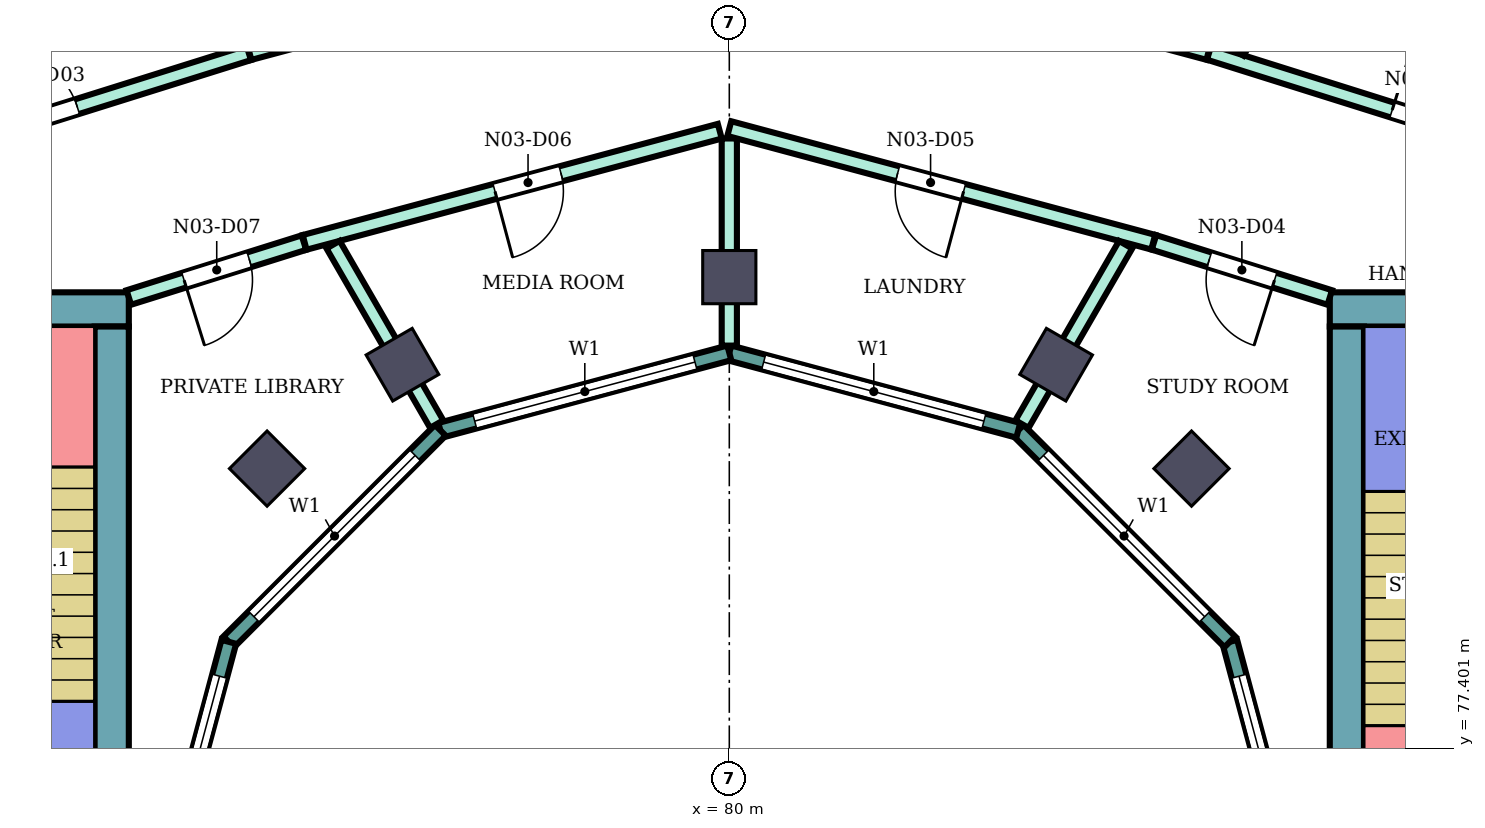
"""IFC4 building model, lengths in metres.
Left out: names, types, materials, properties, quantities, classifications, styles, units other than length and angle.
Written with IfcOpenShell. Run it as: python <this file> out.ifc"""

import sys

from ifc_helpers import new_model, si_unit, direction, frame, frame_2d, origin, origin_2d, place, context, subcontext, project, spatial, rectangle, extrude, element, fill, save


model = new_model("IFC4")
c1 = context("Model", 3, precision=1e-05, world=origin(), true_north=direction((0.0, 1.0)))
c2 = subcontext(c1, "Body", "Model", "MODEL_VIEW")
j1 = project(units=[si_unit("LENGTHUNIT", "METRE"), si_unit("PLANEANGLEUNIT", "RADIAN")], contexts=[c1])
p1 = place(None, origin())
s1 = spatial("IfcSite", under=j1, at=p1, CompositionType="ELEMENT")
p2 = place(p1, origin())
s2 = spatial("IfcBuilding", under=s1, at=p2, CompositionType="ELEMENT")
p3 = place(p2, frame((0.0, 0.0, 292.5)))
s3 = spatial("IfcBuildingStorey", under=s2, at=p3, CompositionType="ELEMENT", Elevation=292.5)
for number, where, z_axis, x_axis in (
    (1, (86.081, 81.081, 0.0), (0.0, 0.0, 1.0), (0.707, 0.707, 0.0)),
    (2, (84.3, 82.448, 0.0), (0.0, 0.0, 1.0), (0.5, 0.866, 0.0)),
    (3, (80.0, 83.6, 0.0), (0.0, 0.0, 1.0), (0.0, 1.0, 0.0)),
    (4, (75.7, 82.448, 0.0), (0.0, 0.0, 1.0), (-0.5, 0.866, 0.0)),
    (5, (73.919, 81.081, 0.0), (0.0, 0.0, 1.0), (-0.707, 0.707, 0.0)),
):
    element("IfcColumn", number, at=place(p3, frame(where, z_axis=z_axis, x_axis=x_axis)), inside=s3, PredefinedType="COLUMN", context=c2, shape_type="SweptSolid", body=[
        extrude(rectangle(XDim=0.7, YDim=0.7, at=origin_2d()), origin(), (0.0, 0.0, 1.0), 4.2),
    ])
p4 = place(p3, frame((87.9, 83.175, 0.0), z_axis=(0.0, 0.0, 1.0), x_axis=(1.0, 0.0, 0.0)))
e6 = element("IfcWall", 6, at=p4, inside=s3, PredefinedType="SHEAR", context=c2, shape_type="SweptSolid", body=[
    extrude(rectangle(XDim=12.0, YDim=0.45, at=frame_2d((6.0, 0.0))), origin(), (0.0, 0.0, 1.0), 3.88),
])
p5 = place(p4, frame((4.2, 0.0, 0.0)))
e7 = element("IfcOpeningElement", 7, at=p5, cuts=e6, PredefinedType="OPENING", context=c2, shape_type="SweptSolid", body=[
    extrude(rectangle(XDim=2.4, YDim=2.4, at=frame_2d((1.2, 1.2))), frame((0.0, 0.235, 0.0), z_axis=(0.0, -1.0, 0.0), x_axis=(1.0, 0.0, 0.0)), (0.0, 0.0, 1.0), 0.47),
])
p6 = place(p3, frame((88.125, 75.0, 0.0), z_axis=(0.0, 0.0, 1.0), x_axis=(0.0, 1.0, 0.0)))
e8 = element("IfcWall", 8, at=p6, inside=s3, PredefinedType="SHEAR", context=c2, shape_type="SweptSolid", body=[
    extrude(rectangle(XDim=7.95, YDim=0.45, at=frame_2d((3.975, 0.0))), origin(), (0.0, 0.0, 1.0), 3.88),
])
p7 = place(p3, frame((72.1, 83.175, 0.0), z_axis=(0.0, 0.0, 1.0), x_axis=(-1.0, 0.0, 0.0)))
e9 = element("IfcWall", 9, at=p7, inside=s3, PredefinedType="SHEAR", context=c2, shape_type="SweptSolid", body=[
    extrude(rectangle(XDim=12.0, YDim=0.45, at=frame_2d((6.0, 0.0))), origin(), (0.0, 0.0, 1.0), 3.88),
])
p8 = place(p7, frame((4.2, 0.0, 0.0)))
e10 = element("IfcOpeningElement", 10, at=p8, cuts=e9, PredefinedType="OPENING", context=c2, shape_type="SweptSolid", body=[
    extrude(rectangle(XDim=2.4, YDim=2.4, at=frame_2d((1.2, 1.2))), frame((0.0, 0.235, 0.0), z_axis=(0.0, -1.0, 0.0), x_axis=(1.0, 0.0, 0.0)), (0.0, 0.0, 1.0), 0.47),
])
p9 = place(p3, frame((71.875, 82.95, 0.0), z_axis=(0.0, 0.0, 1.0), x_axis=(0.0, -1.0, 0.0)))
e11 = element("IfcWall", 11, at=p9, inside=s3, PredefinedType="SHEAR", context=c2, shape_type="SweptSolid", body=[
    extrude(rectangle(XDim=7.95, YDim=0.45, at=frame_2d((3.975, 0.0))), origin(), (0.0, 0.0, 1.0), 3.88),
])
p10 = place(p3, frame((87.604, 75.0, 0.0), z_axis=(0.0, 0.0, 1.0), x_axis=(-0.258789828301, 0.965933654434, 0.0)))
e12 = element("IfcWall", 12, at=p10, inside=s3, PredefinedType="NOTDEFINED", context=c2, shape_type="SweptSolid", body=[
    extrude(rectangle(XDim=3.936, YDim=0.2, at=frame_2d((1.968, 0.0))), origin(), (0.0, 0.0, 1.0), 4.2),
])
p11 = place(p10, frame((0.468, 0.0, 0.9)))
e13 = element("IfcOpeningElement", 13, at=p11, cuts=e12, PredefinedType="OPENING", context=c2, shape_type="SweptSolid", body=[
    extrude(rectangle(XDim=3.0, YDim=2.3, at=frame_2d((1.5, 1.15))), frame((0.0, 0.11, 0.0), z_axis=(0.0, -1.0, 0.0), x_axis=(1.0, 0.0, 0.0)), (0.0, 0.0, 1.0), 0.22),
])
p12 = place(p3, frame((86.585, 78.802, 0.0), z_axis=(0.0, 0.0, 1.0), x_axis=(-0.707106781187, 0.707106781187, 0.0)))
e14 = element("IfcWall", 14, at=p12, inside=s3, PredefinedType="NOTDEFINED", context=c2, shape_type="SweptSolid", body=[
    extrude(rectangle(XDim=3.936, YDim=0.2, at=frame_2d((1.968, 0.0))), origin(), (0.0, 0.0, 1.0), 4.2),
])
p13 = place(p12, frame((0.468, 0.0, 0.9)))
e15 = element("IfcOpeningElement", 15, at=p13, cuts=e14, PredefinedType="OPENING", context=c2, shape_type="SweptSolid", body=[
    extrude(rectangle(XDim=3.0, YDim=2.3, at=frame_2d((1.5, 1.15))), frame((0.0, 0.11, 0.0), z_axis=(0.0, -1.0, 0.0), x_axis=(1.0, 0.0, 0.0)), (0.0, 0.0, 1.0), 0.22),
])
p14 = place(p3, frame((83.802, 81.585, 0.0), z_axis=(0.0, 0.0, 1.0), x_axis=(-0.965933654434, 0.258789828301, 0.0)))
e16 = element("IfcWall", 16, at=p14, inside=s3, PredefinedType="NOTDEFINED", context=c2, shape_type="SweptSolid", body=[
    extrude(rectangle(XDim=3.936, YDim=0.2, at=frame_2d((1.968, 0.0))), origin(), (0.0, 0.0, 1.0), 4.2),
])
p15 = place(p14, frame((0.468, 0.0, 0.9)))
e17 = element("IfcOpeningElement", 17, at=p15, cuts=e16, PredefinedType="OPENING", context=c2, shape_type="SweptSolid", body=[
    extrude(rectangle(XDim=3.0, YDim=2.3, at=frame_2d((1.5, 1.15))), frame((0.0, 0.11, 0.0), z_axis=(0.0, -1.0, 0.0), x_axis=(1.0, 0.0, 0.0)), (0.0, 0.0, 1.0), 0.22),
])
p16 = place(p3, frame((80.0, 82.604, 0.0), z_axis=(0.0, 0.0, 1.0), x_axis=(-0.965933654434, -0.258789828301, 0.0)))
e18 = element("IfcWall", 18, at=p16, inside=s3, PredefinedType="NOTDEFINED", context=c2, shape_type="SweptSolid", body=[
    extrude(rectangle(XDim=3.936, YDim=0.2, at=frame_2d((1.968, 0.0))), origin(), (0.0, 0.0, 1.0), 4.2),
])
p17 = place(p16, frame((0.468, 0.0, 0.9)))
e19 = element("IfcOpeningElement", 19, at=p17, cuts=e18, PredefinedType="OPENING", context=c2, shape_type="SweptSolid", body=[
    extrude(rectangle(XDim=3.0, YDim=2.3, at=frame_2d((1.5, 1.15))), frame((0.0, 0.11, 0.0), z_axis=(0.0, -1.0, 0.0), x_axis=(1.0, 0.0, 0.0)), (0.0, 0.0, 1.0), 0.22),
])
p18 = place(p3, frame((76.198, 81.585, 0.0), z_axis=(0.0, 0.0, 1.0), x_axis=(-0.707106781187, -0.707106781187, 0.0)))
e20 = element("IfcWall", 20, at=p18, inside=s3, PredefinedType="NOTDEFINED", context=c2, shape_type="SweptSolid", body=[
    extrude(rectangle(XDim=3.936, YDim=0.2, at=frame_2d((1.968, 0.0))), origin(), (0.0, 0.0, 1.0), 4.2),
])
p19 = place(p18, frame((0.468, 0.0, 0.9)))
e21 = element("IfcOpeningElement", 21, at=p19, cuts=e20, PredefinedType="OPENING", context=c2, shape_type="SweptSolid", body=[
    extrude(rectangle(XDim=3.0, YDim=2.3, at=frame_2d((1.5, 1.15))), frame((0.0, 0.11, 0.0), z_axis=(0.0, -1.0, 0.0), x_axis=(1.0, 0.0, 0.0)), (0.0, 0.0, 1.0), 0.22),
])
p20 = place(p3, frame((73.415, 78.802, 0.0), z_axis=(0.0, 0.0, 1.0), x_axis=(-0.258789828301, -0.965933654434, 0.0)))
e22 = element("IfcWall", 22, at=p20, inside=s3, PredefinedType="NOTDEFINED", context=c2, shape_type="SweptSolid", body=[
    extrude(rectangle(XDim=3.936, YDim=0.2, at=frame_2d((1.968, 0.0))), origin(), (0.0, 0.0, 1.0), 4.2),
])
p21 = place(p20, frame((0.468, 0.0, 0.9)))
e23 = element("IfcOpeningElement", 23, at=p21, cuts=e22, PredefinedType="OPENING", context=c2, shape_type="SweptSolid", body=[
    extrude(rectangle(XDim=3.0, YDim=2.3, at=frame_2d((1.5, 1.15))), frame((0.0, 0.11, 0.0), z_axis=(0.0, -1.0, 0.0), x_axis=(1.0, 0.0, 0.0)), (0.0, 0.0, 1.0), 0.22),
])
p22 = place(p3, frame((68.201, 84.833, 0.0), z_axis=(0.0, 0.0, 1.0), x_axis=(0.95420102455, 0.299166182492, 0.0)))
e24 = element("IfcWall", 24, at=p22, inside=s3, PredefinedType="PARTITIONING", context=c2, shape_type="SweptSolid", body=[
    extrude(rectangle(XDim=5.74, YDim=0.2, at=frame_2d((2.87, 0.0))), origin(), (0.0, 0.0, 1.0), 3.75),
])
p23 = place(p22, frame((2.374, 0.0, 0.0)))
e25 = element("IfcOpeningElement", 25, at=p23, cuts=e24, PredefinedType="OPENING", context=c2, shape_type="SweptSolid", body=[
    extrude(rectangle(XDim=1.0, YDim=2.1, at=frame_2d((0.5, 1.05))), frame((0.0, 0.11, 0.0), z_axis=(0.0, -1.0, 0.0), x_axis=(1.0, 0.0, 0.0)), (0.0, 0.0, 1.0), 0.22),
])
p24 = place(p3, frame((72.1, 83.332, 0.0), z_axis=(0.0, 0.0, 1.0), x_axis=(0.954233106619, 0.299063836383, 0.0)))
e26 = element("IfcWall", 26, at=p24, inside=s3, PredefinedType="PARTITIONING", context=c2, shape_type="SweptSolid", body=[
    extrude(rectangle(XDim=2.414, YDim=0.2, at=frame_2d((1.207, 0.0))), origin(), (0.0, 0.0, 1.0), 3.75),
])
p25 = place(p24, frame((0.762, 0.0, 0.0)))
e27 = element("IfcOpeningElement", 27, at=p25, cuts=e26, PredefinedType="OPENING", context=c2, shape_type="SweptSolid", body=[
    extrude(rectangle(XDim=0.9, YDim=2.1, at=frame_2d((0.45, 1.05))), frame((0.0, 0.11, 0.0), z_axis=(0.0, -1.0, 0.0), x_axis=(1.0, 0.0, 0.0)), (0.0, 0.0, 1.0), 0.22),
])
p26 = place(p3, frame((73.687, 86.555, 0.0), z_axis=(0.0, 0.0, 1.0), x_axis=(0.965987897826, 0.258587279759, 0.0)))
e28 = element("IfcWall", 28, at=p26, inside=s3, PredefinedType="PARTITIONING", context=c2, shape_type="SweptSolid", body=[
    extrude(rectangle(XDim=3.007, YDim=0.2, at=frame_2d((1.503, 0.0))), origin(), (0.0, 0.0, 1.0), 3.75),
])
p27 = place(p3, frame((74.413, 84.057, 0.0), z_axis=(0.0, 0.0, 1.0), x_axis=(0.965972135939, 0.258646153246, 0.0)))
e29 = element("IfcWall", 29, at=p27, inside=s3, PredefinedType="PARTITIONING", context=c2, shape_type="SweptSolid", body=[
    extrude(rectangle(XDim=5.654, YDim=0.2, at=frame_2d((2.827, 0.0))), origin(), (0.0, 0.0, 1.0), 3.75),
])
p28 = place(p27, frame((2.593, 0.0, 0.0)))
e30 = element("IfcOpeningElement", 30, at=p28, cuts=e29, PredefinedType="OPENING", context=c2, shape_type="SweptSolid", body=[
    extrude(rectangle(XDim=0.9, YDim=2.1, at=frame_2d((0.45, 1.05))), frame((0.0, 0.11, 0.0), z_axis=(0.0, -1.0, 0.0), x_axis=(1.0, 0.0, 0.0)), (0.0, 0.0, 1.0), 0.22),
])
p29 = place(p3, frame((74.787, 84.027, 0.0), z_axis=(0.0, 0.0, 1.0), x_axis=(0.500079107518, -0.86597972622, 0.0)))
e31 = element("IfcWall", 31, at=p29, inside=s3, PredefinedType="PARTITIONING", context=c2, shape_type="SweptSolid", body=[
    extrude(rectangle(XDim=2.726, YDim=0.2, at=frame_2d((1.363, 0.0))), origin(), (0.0, 0.0, 1.0), 3.75),
])
p30 = place(p3, frame((80.0, 82.699, 0.0), z_axis=(0.0, 0.0, 1.0), x_axis=(0.0, 1.0, 0.0)))
e32 = element("IfcWall", 32, at=p30, inside=s3, PredefinedType="PARTITIONING", context=c2, shape_type="SweptSolid", body=[
    extrude(rectangle(XDim=2.725, YDim=0.2, at=frame_2d((1.363, 0.0))), origin(), (0.0, 0.0, 1.0), 3.75),
])
p31 = place(p3, frame((80.0, 85.554, 0.0), z_axis=(0.0, 0.0, 1.0), x_axis=(0.965928989968, -0.258807237802, 0.0)))
e33 = element("IfcWall", 33, at=p31, inside=s3, PredefinedType="PARTITIONING", context=c2, shape_type="SweptSolid", body=[
    extrude(rectangle(XDim=5.774, YDim=0.2, at=frame_2d((2.887, 0.0))), origin(), (0.0, 0.0, 1.0), 3.75),
])
p32 = place(p31, frame((2.292, 0.0, 0.0)))
e34 = element("IfcOpeningElement", 34, at=p32, cuts=e33, PredefinedType="OPENING", context=c2, shape_type="SweptSolid", body=[
    extrude(rectangle(XDim=0.9, YDim=2.1, at=frame_2d((0.45, 1.05))), frame((0.0, 0.11, 0.0), z_axis=(0.0, -1.0, 0.0), x_axis=(1.0, 0.0, 0.0)), (0.0, 0.0, 1.0), 0.22),
])
p33 = place(p3, frame((80.0, 88.246, 0.0), z_axis=(0.0, 0.0, 1.0), x_axis=(0.965856994925, -0.259075790752, 0.0)))
e35 = element("IfcWall", 35, at=p33, inside=s3, PredefinedType="PARTITIONING", context=c2, shape_type="SweptSolid", body=[
    extrude(rectangle(XDim=6.526, YDim=0.2, at=frame_2d((3.263, 0.0))), origin(), (0.0, 0.0, 1.0), 3.75),
])
p34 = place(p33, frame((2.768, 0.0, 0.0)))
e36 = element("IfcOpeningElement", 36, at=p34, cuts=e35, PredefinedType="OPENING", context=c2, shape_type="SweptSolid", body=[
    extrude(rectangle(XDim=1.0, YDim=2.1, at=frame_2d((0.5, 1.05))), frame((0.0, 0.11, 0.0), z_axis=(0.0, -1.0, 0.0), x_axis=(1.0, 0.0, 0.0)), (0.0, 0.0, 1.0), 0.22),
])
p35 = place(p3, frame((83.851, 81.666, 0.0), z_axis=(0.0, 0.0, 1.0), x_axis=(0.500146274735, 0.865940935554, 0.0)))
e37 = element("IfcWall", 37, at=p35, inside=s3, PredefinedType="PARTITIONING", context=c2, shape_type="SweptSolid", body=[
    extrude(rectangle(XDim=2.726, YDim=0.2, at=frame_2d((1.363, 0.0))), origin(), (0.0, 0.0, 1.0), 3.75),
])
p36 = place(p3, frame((85.587, 84.057, 0.0), z_axis=(0.0, 0.0, 1.0), x_axis=(0.954239513179, -0.299043393987, 0.0)))
e38 = element("IfcWall", 38, at=p36, inside=s3, PredefinedType="PARTITIONING", context=c2, shape_type="SweptSolid", body=[
    extrude(rectangle(XDim=2.424, YDim=0.2, at=frame_2d((1.212, 0.0))), origin(), (0.0, 0.0, 1.0), 3.75),
])
p37 = place(p36, frame((0.762, 0.0, 0.0)))
e39 = element("IfcOpeningElement", 39, at=p37, cuts=e38, PredefinedType="OPENING", context=c2, shape_type="SweptSolid", body=[
    extrude(rectangle(XDim=0.9, YDim=2.1, at=frame_2d((0.45, 1.05))), frame((0.0, 0.11, 0.0), z_axis=(0.0, -1.0, 0.0), x_axis=(1.0, 0.0, 0.0)), (0.0, 0.0, 1.0), 0.22),
])
p38 = place(p3, frame((86.314, 86.556, 0.0), z_axis=(0.0, 0.0, 1.0), x_axis=(0.953912400139, -0.300085209334, 0.0)))
e40 = element("IfcWall", 40, at=p38, inside=s3, PredefinedType="PARTITIONING", context=c2, shape_type="SweptSolid", body=[
    extrude(rectangle(XDim=5.719, YDim=0.2, at=frame_2d((2.86, 0.0))), origin(), (0.0, 0.0, 1.0), 3.75),
])
p39 = place(p38, frame((2.524, 0.0, 0.0)))
e41 = element("IfcOpeningElement", 41, at=p39, cuts=e40, PredefinedType="OPENING", context=c2, shape_type="SweptSolid", body=[
    extrude(rectangle(XDim=1.0, YDim=2.1, at=frame_2d((0.5, 1.05))), frame((0.0, 0.11, 0.0), z_axis=(0.0, -1.0, 0.0), x_axis=(1.0, 0.0, 0.0)), (0.0, 0.0, 1.0), 0.22),
])
p40 = place(p3, frame((86.679, 86.563, 0.0), z_axis=(0.0, 0.0, 1.0), x_axis=(0.500152516677, 0.865937330331, 0.0)))
e42 = element("IfcWall", 42, at=p40, inside=s3, PredefinedType="PARTITIONING", context=c2, shape_type="SweptSolid", body=[
    extrude(rectangle(XDim=8.943, YDim=0.2, at=frame_2d((4.472, 0.0))), origin(), (0.0, 0.0, 1.0), 3.75),
])
p41 = place(p11, origin())
e43 = element("IfcWindow", 43, at=p41, inside=s3, PartitioningType="SINGLE_PANEL", PredefinedType="WINDOW", context=c2, shape_type="SweptSolid", body=[
    extrude(rectangle(XDim=3.0, YDim=2.3, at=frame_2d((1.5, 1.15))), frame((0.0, 0.03, 0.0), z_axis=(0.0, -1.0, 0.0), x_axis=(1.0, 0.0, 0.0)), (0.0, 0.0, 1.0), 0.06),
])
fill(e13, e43)
p42 = place(p13, origin())
e44 = element("IfcWindow", 44, at=p42, inside=s3, PartitioningType="SINGLE_PANEL", PredefinedType="WINDOW", context=c2, shape_type="SweptSolid", body=[
    extrude(rectangle(XDim=3.0, YDim=2.3, at=frame_2d((1.5, 1.15))), frame((0.0, 0.03, 0.0), z_axis=(0.0, -1.0, 0.0), x_axis=(1.0, 0.0, 0.0)), (0.0, 0.0, 1.0), 0.06),
])
fill(e15, e44)
p43 = place(p15, origin())
e45 = element("IfcWindow", 45, at=p43, inside=s3, PartitioningType="SINGLE_PANEL", PredefinedType="WINDOW", context=c2, shape_type="SweptSolid", body=[
    extrude(rectangle(XDim=3.0, YDim=2.3, at=frame_2d((1.5, 1.15))), frame((0.0, 0.03, 0.0), z_axis=(0.0, -1.0, 0.0), x_axis=(1.0, 0.0, 0.0)), (0.0, 0.0, 1.0), 0.06),
])
fill(e17, e45)
p44 = place(p17, origin())
e46 = element("IfcWindow", 46, at=p44, inside=s3, PartitioningType="SINGLE_PANEL", PredefinedType="WINDOW", context=c2, shape_type="SweptSolid", body=[
    extrude(rectangle(XDim=3.0, YDim=2.3, at=frame_2d((1.5, 1.15))), frame((0.0, 0.03, 0.0), z_axis=(0.0, -1.0, 0.0), x_axis=(1.0, 0.0, 0.0)), (0.0, 0.0, 1.0), 0.06),
])
fill(e19, e46)
p45 = place(p19, origin())
e47 = element("IfcWindow", 47, at=p45, inside=s3, PartitioningType="SINGLE_PANEL", PredefinedType="WINDOW", context=c2, shape_type="SweptSolid", body=[
    extrude(rectangle(XDim=3.0, YDim=2.3, at=frame_2d((1.5, 1.15))), frame((0.0, 0.03, 0.0), z_axis=(0.0, -1.0, 0.0), x_axis=(1.0, 0.0, 0.0)), (0.0, 0.0, 1.0), 0.06),
])
fill(e21, e47)
p46 = place(p21, origin())
e48 = element("IfcWindow", 48, at=p46, inside=s3, PartitioningType="SINGLE_PANEL", PredefinedType="WINDOW", context=c2, shape_type="SweptSolid", body=[
    extrude(rectangle(XDim=3.0, YDim=2.3, at=frame_2d((1.5, 1.15))), frame((0.0, 0.03, 0.0), z_axis=(0.0, -1.0, 0.0), x_axis=(1.0, 0.0, 0.0)), (0.0, 0.0, 1.0), 0.06),
])
fill(e23, e48)
p47 = place(p39, origin())
e49 = element("IfcDoor", 49, at=p47, inside=s3, OperationType="SINGLE_SWING_LEFT", PredefinedType="DOOR", context=c2, shape_type="SweptSolid", body=[
    extrude(rectangle(XDim=1.0, YDim=2.1, at=frame_2d((0.5, 1.05))), frame((0.0, 0.025, 0.0), z_axis=(0.0, -1.0, 0.0), x_axis=(1.0, 0.0, 0.0)), (0.0, 0.0, 1.0), 0.05),
])
fill(e41, e49)
p48 = place(p23, origin())
e50 = element("IfcDoor", 50, at=p48, inside=s3, OperationType="SINGLE_SWING_LEFT", PredefinedType="DOOR", context=c2, shape_type="SweptSolid", body=[
    extrude(rectangle(XDim=1.0, YDim=2.1, at=frame_2d((0.5, 1.05))), frame((0.0, 0.025, 0.0), z_axis=(0.0, -1.0, 0.0), x_axis=(1.0, 0.0, 0.0)), (0.0, 0.0, 1.0), 0.05),
])
fill(e25, e50)
p49 = place(p37, frame((0.9, 0.0, 0.0), z_axis=(0.0, 0.0, 1.0), x_axis=(-1.0, 0.0, 0.0)))
e51 = element("IfcDoor", 51, at=p49, inside=s3, OperationType="SINGLE_SWING_LEFT", PredefinedType="DOOR", context=c2, shape_type="SweptSolid", body=[
    extrude(rectangle(XDim=0.9, YDim=2.1, at=frame_2d((0.45, 1.05))), frame((0.0, 0.025, 0.0), z_axis=(0.0, -1.0, 0.0), x_axis=(1.0, 0.0, 0.0)), (0.0, 0.0, 1.0), 0.05),
])
fill(e39, e51)
p50 = place(p32, frame((0.9, 0.0, 0.0), z_axis=(0.0, 0.0, 1.0), x_axis=(-1.0, 0.0, 0.0)))
e52 = element("IfcDoor", 52, at=p50, inside=s3, OperationType="SINGLE_SWING_LEFT", PredefinedType="DOOR", context=c2, shape_type="SweptSolid", body=[
    extrude(rectangle(XDim=0.9, YDim=2.1, at=frame_2d((0.45, 1.05))), frame((0.0, 0.025, 0.0), z_axis=(0.0, -1.0, 0.0), x_axis=(1.0, 0.0, 0.0)), (0.0, 0.0, 1.0), 0.05),
])
fill(e34, e52)
p51 = place(p28, frame((0.9, 0.0, 0.0), z_axis=(0.0, 0.0, 1.0), x_axis=(-1.0, 0.0, 0.0)))
e53 = element("IfcDoor", 53, at=p51, inside=s3, OperationType="SINGLE_SWING_RIGHT", PredefinedType="DOOR", context=c2, shape_type="SweptSolid", body=[
    extrude(rectangle(XDim=0.9, YDim=2.1, at=frame_2d((0.45, 1.05))), frame((0.0, 0.025, 0.0), z_axis=(0.0, -1.0, 0.0), x_axis=(1.0, 0.0, 0.0)), (0.0, 0.0, 1.0), 0.05),
])
fill(e30, e53)
p52 = place(p25, frame((0.9, 0.0, 0.0), z_axis=(0.0, 0.0, 1.0), x_axis=(-1.0, 0.0, 0.0)))
e54 = element("IfcDoor", 54, at=p52, inside=s3, OperationType="SINGLE_SWING_RIGHT", PredefinedType="DOOR", context=c2, shape_type="SweptSolid", body=[
    extrude(rectangle(XDim=0.9, YDim=2.1, at=frame_2d((0.45, 1.05))), frame((0.0, 0.025, 0.0), z_axis=(0.0, -1.0, 0.0), x_axis=(1.0, 0.0, 0.0)), (0.0, 0.0, 1.0), 0.05),
])
fill(e27, e54)
save(model, sys.argv[1])
